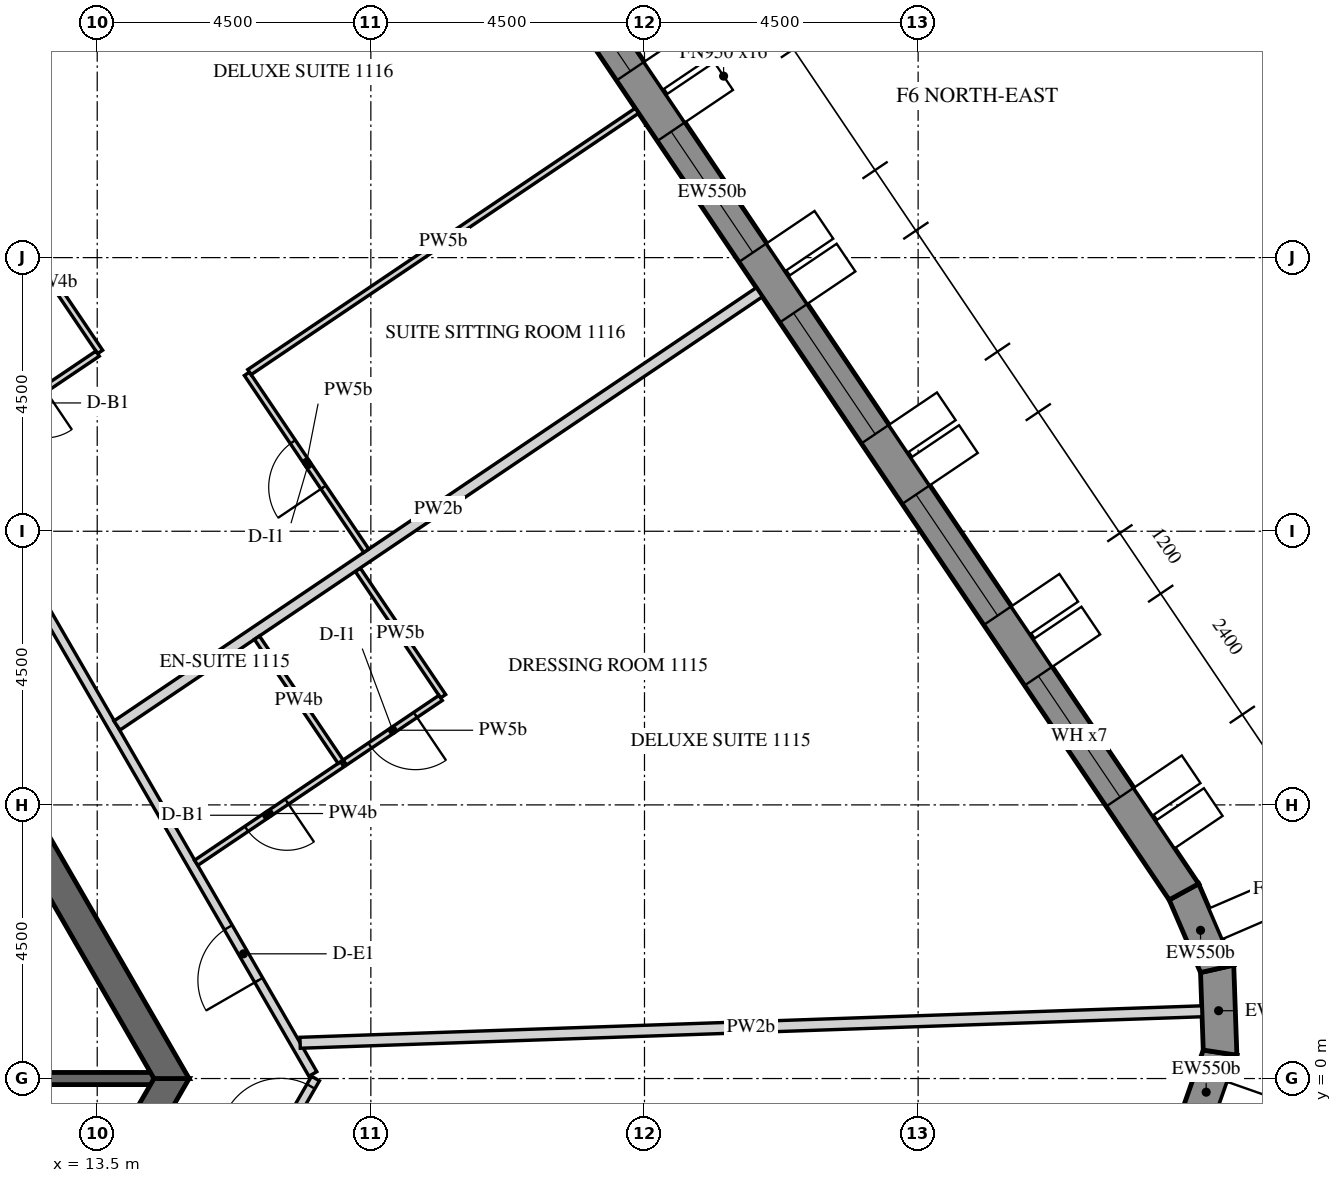
"""IFC4 building model, lengths in metres.
Left out: names, types, materials, properties, quantities, classifications, styles, units other than length and angle.
Written with IfcOpenShell. Run it as: python <this file> out.ifc"""

import sys

from ifc_helpers import new_model, si_unit, direction, frame, frame_2d, origin, place, context, subcontext, project, spatial, polyline, rectangle, outline, extrude, element, fill, save


model = new_model("IFC4")
c1 = context("Model", 3, precision=1e-05, world=origin(), true_north=direction((0.0, 1.0)))
c2 = subcontext(c1, "Body", "Model", "MODEL_VIEW")
j1 = project(units=[si_unit("LENGTHUNIT", "METRE"), si_unit("PLANEANGLEUNIT", "RADIAN")], contexts=[c1])
p1 = place(None, origin())
s1 = spatial("IfcSite", under=j1, at=p1, CompositionType="ELEMENT")
p2 = place(p1, origin())
s2 = spatial("IfcBuilding", under=s1, at=p2, CompositionType="ELEMENT")
p3 = place(p2, frame((0.0, 0.0, 152.7)))
s3 = spatial("IfcBuildingStorey", under=s2, at=p3, CompositionType="ELEMENT", Elevation=152.7)
p4 = place(p3, frame((31.509, -0.875, 0.0), z_axis=(0.0, 0.0, 1.0), x_axis=(0.33111537203, 0.943590276765, 0.0)))
e1 = element("IfcWall", 1, at=p4, inside=s3, PredefinedType="SOLIDWALL", context=c2, shape_type="SweptSolid", body=[
    extrude(outline(polyline([(-0.026, -0.275), (1.431, -0.275), (1.327, 0.275), (0.026, 0.275), (-0.026, -0.275)])), origin(), (0.0, 0.0, 1.0), 3.75),
])
p5 = place(p3, frame((31.966, 0.426, 0.0), z_axis=(0.0, 0.0, 1.0), x_axis=(-0.034876908462, 0.999391615562, 0.0)))
e2 = element("IfcWall", 2, at=p5, inside=s3, PredefinedType="SOLIDWALL", context=c2, shape_type="SweptSolid", body=[
    extrude(outline(polyline([(-0.052, -0.275), (1.431, -0.275), (1.327, 0.275), (0.052, 0.275), (-0.052, -0.275)])), origin(), (0.0, 0.0, 1.0), 3.75),
])
p6 = place(p3, frame((31.917, 1.804, 0.0), z_axis=(0.0, 0.0, 1.0), x_axis=(-0.396225741392, 0.918153125496, 0.0)))
e3 = element("IfcWall", 3, at=p6, inside=s3, PredefinedType="SOLIDWALL", context=c2, shape_type="SweptSolid", body=[
    extrude(outline(polyline([(-0.052, -0.275), (1.405, -0.275), (1.353, 0.275), (0.052, 0.275), (-0.052, -0.275)])), origin(), (0.0, 0.0, 1.0), 3.75),
])
p7 = place(p3, frame((31.371, 3.071, 0.0), z_axis=(0.0, 0.0, 1.0), x_axis=(-0.559189891278, 0.829039604297, 0.0)))
e4 = element("IfcWall", 4, at=p7, inside=s3, PredefinedType="SOLIDWALL", context=c2, shape_type="SweptSolid", body=[
    extrude(outline(polyline([(-0.026, -0.275), (27.781, -0.275), (27.736, 0.275), (0.026, 0.275), (-0.026, -0.275)])), origin(), (0.0, 0.0, 1.0), 3.75),
])
p8 = place(p7, frame((1.879, 0.0, 0.9)))
e5 = element("IfcOpeningElement", 5, at=p8, cuts=e4, PredefinedType="OPENING", context=c2, shape_type="SweptSolid", body=[
    extrude(rectangle(XDim=2.4, YDim=2.4, at=frame_2d((1.2, 1.2))), frame((0.0, 0.285, 0.0), z_axis=(0.0, -1.0, 0.0), x_axis=(1.0, 0.0, 0.0)), (0.0, 0.0, 1.0), 0.57),
])
p9 = place(p7, frame((5.479, 0.0, 0.9)))
e6 = element("IfcOpeningElement", 6, at=p9, cuts=e4, PredefinedType="OPENING", context=c2, shape_type="SweptSolid", body=[
    extrude(rectangle(XDim=2.4, YDim=2.4, at=frame_2d((1.2, 1.2))), frame((0.0, 0.285, 0.0), z_axis=(0.0, -1.0, 0.0), x_axis=(1.0, 0.0, 0.0)), (0.0, 0.0, 1.0), 0.57),
])
p10 = place(p7, frame((9.079, 0.0, 0.9)))
e7 = element("IfcOpeningElement", 7, at=p10, cuts=e4, PredefinedType="OPENING", context=c2, shape_type="SweptSolid", body=[
    extrude(rectangle(XDim=2.4, YDim=2.4, at=frame_2d((1.2, 1.2))), frame((0.0, 0.285, 0.0), z_axis=(0.0, -1.0, 0.0), x_axis=(1.0, 0.0, 0.0)), (0.0, 0.0, 1.0), 0.57),
])
p11 = place(p7, frame((12.679, 0.0, 0.9)))
e8 = element("IfcOpeningElement", 8, at=p11, cuts=e4, PredefinedType="OPENING", context=c2, shape_type="SweptSolid", body=[
    extrude(rectangle(XDim=2.4, YDim=2.4, at=frame_2d((1.2, 1.2))), frame((0.0, 0.285, 0.0), z_axis=(0.0, -1.0, 0.0), x_axis=(1.0, 0.0, 0.0)), (0.0, 0.0, 1.0), 0.57),
])
p12 = place(p7, frame((16.279, 0.0, 0.9)))
e9 = element("IfcOpeningElement", 9, at=p12, cuts=e4, PredefinedType="OPENING", context=c2, shape_type="SweptSolid", body=[
    extrude(rectangle(XDim=2.4, YDim=2.4, at=frame_2d((1.2, 1.2))), frame((0.0, 0.285, 0.0), z_axis=(0.0, -1.0, 0.0), x_axis=(1.0, 0.0, 0.0)), (0.0, 0.0, 1.0), 0.57),
])
p13 = place(p7, frame((19.879, 0.0, 0.9)))
e10 = element("IfcOpeningElement", 10, at=p13, cuts=e4, PredefinedType="OPENING", context=c2, shape_type="SweptSolid", body=[
    extrude(rectangle(XDim=2.4, YDim=2.4, at=frame_2d((1.2, 1.2))), frame((0.0, 0.285, 0.0), z_axis=(0.0, -1.0, 0.0), x_axis=(1.0, 0.0, 0.0)), (0.0, 0.0, 1.0), 0.57),
])
p14 = place(p7, frame((23.479, 0.0, 0.9)))
e11 = element("IfcOpeningElement", 11, at=p14, cuts=e4, PredefinedType="OPENING", context=c2, shape_type="SweptSolid", body=[
    extrude(rectangle(XDim=2.4, YDim=2.4, at=frame_2d((1.2, 1.2))), frame((0.0, 0.285, 0.0), z_axis=(0.0, -1.0, 0.0), x_axis=(1.0, 0.0, 0.0)), (0.0, 0.0, 1.0), 0.57),
])
p15 = place(p3, frame((7.361, -12.75, 0.0), z_axis=(0.0, 0.0, 1.0), x_axis=(0.50000571537, 0.866022103989, 0.0)))
e12 = element("IfcWall", 12, at=p15, inside=s3, PredefinedType="SHEAR", context=c2, shape_type="SweptSolid", body=[
    extrude(outline(polyline([(-0.144, -0.25), (14.867, -0.25), (14.578, 0.25), (0.144, 0.25), (-0.144, -0.25)])), origin(), (0.0, 0.0, 1.0), 3.75),
])
p16 = place(p15, frame((6.49, 0.0, 0.0)))
e13 = element("IfcOpeningElement", 13, at=p16, cuts=e12, PredefinedType="OPENING", context=c2, shape_type="SweptSolid", body=[
    extrude(rectangle(XDim=1.8, YDim=2.4, at=frame_2d((0.9, 1.2))), frame((0.0, 0.26, 0.0), z_axis=(0.0, -1.0, 0.0), x_axis=(1.0, 0.0, 0.0)), (0.0, 0.0, 1.0), 0.52),
])
p17 = place(p3, frame((14.722, 0.0, 0.0), z_axis=(0.0, 0.0, 1.0), x_axis=(-0.50000571537, 0.866022103989, 0.0)))
e14 = element("IfcWall", 14, at=p17, inside=s3, PredefinedType="SHEAR", context=c2, shape_type="SweptSolid", body=[
    extrude(outline(polyline([(-0.144, -0.25), (14.867, -0.25), (14.578, 0.25), (0.144, 0.25), (-0.144, -0.25)])), origin(), (0.0, 0.0, 1.0), 3.75),
])
p18 = place(p17, frame((6.432, 0.0, 0.0)))
e15 = element("IfcOpeningElement", 15, at=p18, cuts=e14, PredefinedType="OPENING", context=c2, shape_type="SweptSolid", body=[
    extrude(rectangle(XDim=1.8, YDim=2.4, at=frame_2d((0.9, 1.2))), frame((0.0, 0.26, 0.0), z_axis=(0.0, -1.0, 0.0), x_axis=(1.0, 0.0, 0.0)), (0.0, 0.0, 1.0), 0.52),
])
p19 = place(p3, frame((7.506, 13.0, 0.0), z_axis=(0.0, 0.0, 1.0), x_axis=(0.499988271576, 0.866032175087, 0.0)))
e16 = element("IfcWall", 16, at=p19, inside=s3, PredefinedType="SHEAR", context=c2, shape_type="SweptSolid", body=[
    extrude(rectangle(XDim=15.424, YDim=0.5, at=frame_2d((7.712, 0.0))), origin(), (0.0, 0.0, 1.0), 3.75),
])
p20 = place(p19, frame((6.812, 0.0, 0.0)))
e17 = element("IfcOpeningElement", 17, at=p20, cuts=e16, PredefinedType="OPENING", context=c2, shape_type="SweptSolid", body=[
    extrude(rectangle(XDim=1.8, YDim=2.4, at=frame_2d((0.9, 1.2))), frame((0.0, 0.26, 0.0), z_axis=(0.0, -1.0, 0.0), x_axis=(1.0, 0.0, 0.0)), (0.0, 0.0, 1.0), 0.52),
])
p21 = place(p3, frame((11.547, 0.0, 0.0), z_axis=(0.0, 0.0, 1.0), x_axis=(1.0, 0.0, 0.0)))
e18 = element("IfcWall", 18, at=p21, inside=s3, PredefinedType="SHEAR", context=c2, shape_type="SweptSolid", body=[
    extrude(rectangle(XDim=2.887, YDim=0.2, at=frame_2d((1.443, 0.0))), origin(), (0.0, 0.0, 1.0), 3.75),
])
p22 = place(p3, frame((10.714, -11.043, 0.0), z_axis=(0.0, 0.0, 1.0), x_axis=(0.500001980452, 0.866024260367, 0.0)))
e19 = element("IfcWall", 19, at=p22, inside=s3, PredefinedType="PARTITIONING", context=c2, shape_type="SweptSolid", body=[
    extrude(rectangle(XDim=12.752, YDim=0.15, at=frame_2d((6.376, 0.0))), origin(), (0.0, 0.0, 1.0), 2.823),
])
p23 = place(p22, frame((3.625, 0.0, 0.0)))
e20 = element("IfcOpeningElement", 20, at=p23, cuts=e19, PredefinedType="OPENING", context=c2, shape_type="SweptSolid", body=[
    extrude(rectangle(XDim=1.0, YDim=2.1, at=frame_2d((0.5, 1.05))), frame((0.0, 0.085, 0.0), z_axis=(0.0, -1.0, 0.0), x_axis=(1.0, 0.0, 0.0)), (0.0, 0.0, 1.0), 0.17),
])
p24 = place(p22, frame((11.602, 0.0, 0.0)))
e21 = element("IfcOpeningElement", 21, at=p24, cuts=e19, PredefinedType="OPENING", context=c2, shape_type="SweptSolid", body=[
    extrude(rectangle(XDim=1.0, YDim=2.1, at=frame_2d((0.5, 1.05))), frame((0.0, 0.085, 0.0), z_axis=(0.0, -1.0, 0.0), x_axis=(1.0, 0.0, 0.0)), (0.0, 0.0, 1.0), 0.17),
])
p25 = place(p3, frame((17.046, 0.075, 0.0), z_axis=(0.0, 0.0, 1.0), x_axis=(-0.499999403554, 0.866025748143, 0.0)))
e22 = element("IfcWall", 22, at=p25, inside=s3, PredefinedType="PARTITIONING", context=c2, shape_type="SweptSolid", body=[
    extrude(rectangle(XDim=14.549, YDim=0.15, at=frame_2d((7.275, 0.0))), origin(), (0.0, 0.0, 1.0), 2.823),
])
p26 = place(p25, frame((1.781, 0.0, 0.0)))
e23 = element("IfcOpeningElement", 23, at=p26, cuts=e22, PredefinedType="OPENING", context=c2, shape_type="SweptSolid", body=[
    extrude(rectangle(XDim=1.0, YDim=2.1, at=frame_2d((0.5, 1.05))), frame((0.0, 0.085, 0.0), z_axis=(0.0, -1.0, 0.0), x_axis=(1.0, 0.0, 0.0)), (0.0, 0.0, 1.0), 0.17),
])
p27 = place(p25, frame((8.705, 0.0, 0.0)))
e24 = element("IfcOpeningElement", 24, at=p27, cuts=e22, PredefinedType="OPENING", context=c2, shape_type="SweptSolid", body=[
    extrude(rectangle(XDim=1.0, YDim=2.1, at=frame_2d((0.5, 1.05))), frame((0.0, 0.085, 0.0), z_axis=(0.0, -1.0, 0.0), x_axis=(1.0, 0.0, 0.0)), (0.0, 0.0, 1.0), 0.17),
])
p28 = place(p3, frame((9.728, 12.75, 0.0), z_axis=(0.0, 0.0, 1.0), x_axis=(0.500007149838, 0.866021275784, 0.0)))
e25 = element("IfcWall", 25, at=p28, inside=s3, PredefinedType="PARTITIONING", context=c2, shape_type="SweptSolid", body=[
    extrude(rectangle(XDim=8.017, YDim=0.15, at=frame_2d((4.009, 0.0))), origin(), (0.0, 0.0, 1.0), 2.823),
])
p29 = place(p3, frame((31.667, 1.106, 0.0), z_axis=(0.0, 0.0, 1.0), x_axis=(-0.999390937365, -0.034896336667, 0.0)))
e26 = element("IfcWall", 26, at=p29, inside=s3, PredefinedType="PARTITIONING", context=c2, shape_type="SweptSolid", body=[
    extrude(rectangle(XDim=14.839, YDim=0.18, at=frame_2d((7.419, 0.0))), origin(), (0.0, 0.0, 1.0), 2.823),
])
p30 = place(p3, frame((17.53, 5.168, 0.0), z_axis=(0.0, 0.0, 1.0), x_axis=(-0.829031257997, -0.559202265073, 0.0)))
e27 = element("IfcWall", 27, at=p30, inside=s3, PredefinedType="PARTITIONING", context=c2, shape_type="SweptSolid", body=[
    extrude(rectangle(XDim=2.898, YDim=0.1, at=frame_2d((1.449, 0.0))), origin(), (0.0, 0.0, 1.0), 2.823),
])
p31 = place(p30, frame((1.1, 0.0, 0.0)))
e28 = element("IfcOpeningElement", 28, at=p31, cuts=e27, PredefinedType="OPENING", context=c2, shape_type="SweptSolid", body=[
    extrude(rectangle(XDim=0.8, YDim=2.1, at=frame_2d((0.4, 1.05))), frame((0.0, 0.06, 0.0), z_axis=(0.0, -1.0, 0.0), x_axis=(1.0, 0.0, 0.0)), (0.0, 0.0, 1.0), 0.12),
])
p32 = place(p3, frame((17.785, 8.368, 0.0), z_axis=(0.0, 0.0, 1.0), x_axis=(0.559203861497, -0.829030181168, 0.0)))
e29 = element("IfcWall", 29, at=p32, inside=s3, PredefinedType="PARTITIONING", context=c2, shape_type="SweptSolid", body=[
    extrude(rectangle(XDim=2.51, YDim=0.1, at=frame_2d((1.255, 0.0))), origin(), (0.0, 0.0, 1.0), 2.823),
])
p33 = place(p3, frame((19.147, 6.259, 0.0), z_axis=(0.0, 0.0, 1.0), x_axis=(-0.82903334026, -0.559199178055, 0.0)))
e30 = element("IfcWall", 30, at=p33, inside=s3, PredefinedType="PARTITIONING", context=c2, shape_type="SweptSolid", body=[
    extrude(rectangle(XDim=1.9, YDim=0.1, at=frame_2d((0.95, 0.0))), origin(), (0.0, 0.0, 1.0), 2.823),
])
p34 = place(p33, frame((0.5, 0.0, 0.0)))
e31 = element("IfcOpeningElement", 31, at=p34, cuts=e30, PredefinedType="OPENING", context=c2, shape_type="SweptSolid", body=[
    extrude(rectangle(XDim=0.9, YDim=2.1, at=frame_2d((0.45, 1.05))), frame((0.0, 0.06, 0.0), z_axis=(0.0, -1.0, 0.0), x_axis=(1.0, 0.0, 0.0)), (0.0, 0.0, 1.0), 0.12),
])
p35 = place(p3, frame((24.389, 12.931, 0.0), z_axis=(0.0, 0.0, 1.0), x_axis=(-0.829049407957, -0.559175356365, 0.0)))
e32 = element("IfcWall", 32, at=p35, inside=s3, PredefinedType="PARTITIONING", context=c2, shape_type="SweptSolid", body=[
    extrude(rectangle(XDim=12.743, YDim=0.18, at=frame_2d((6.372, 0.0))), origin(), (0.0, 0.0, 1.0), 2.823),
])
p36 = place(p3, frame((17.502, 5.21, 0.0), z_axis=(0.0, 0.0, 1.0), x_axis=(-0.559203533395, 0.829030402481, 0.0)))
e33 = element("IfcWall", 33, at=p36, inside=s3, PredefinedType="PARTITIONING", context=c2, shape_type="SweptSolid", body=[
    extrude(rectangle(XDim=2.46, YDim=0.1, at=frame_2d((1.23, 0.0))), origin(), (0.0, 0.0, 1.0), 2.823),
])
p37 = place(p3, frame((12.01, 14.229, 0.0), z_axis=(0.0, 0.0, 1.0), x_axis=(0.559158698756, -0.8290606429, 0.0)))
e34 = element("IfcWall", 34, at=p37, inside=s3, PredefinedType="PARTITIONING", context=c2, shape_type="SweptSolid", body=[
    extrude(rectangle(XDim=2.75, YDim=0.1, at=frame_2d((1.375, 0.0))), origin(), (0.0, 0.0, 1.0), 2.823),
])
p38 = place(p3, frame((13.506, 11.921, 0.0), z_axis=(0.0, 0.0, 1.0), x_axis=(-0.829048535811, -0.559176649431, 0.0)))
e35 = element("IfcWall", 35, at=p38, inside=s3, PredefinedType="PARTITIONING", context=c2, shape_type="SweptSolid", body=[
    extrude(rectangle(XDim=2.789, YDim=0.1, at=frame_2d((1.395, 0.0))), origin(), (0.0, 0.0, 1.0), 2.823),
])
p39 = place(p38, frame((1.05, 0.0, 0.0)))
e36 = element("IfcOpeningElement", 36, at=p39, cuts=e35, PredefinedType="OPENING", context=c2, shape_type="SweptSolid", body=[
    extrude(rectangle(XDim=0.8, YDim=2.1, at=frame_2d((0.4, 1.05))), frame((0.0, 0.06, 0.0), z_axis=(0.0, -1.0, 0.0), x_axis=(1.0, 0.0, 0.0)), (0.0, 0.0, 1.0), 0.12),
])
p40 = place(p3, frame((17.925, 8.679, 0.0), z_axis=(0.0, 0.0, 1.0), x_axis=(-0.559170576854, 0.829052631611, 0.0)))
e37 = element("IfcWall", 37, at=p40, inside=s3, PredefinedType="PARTITIONING", context=c2, shape_type="SweptSolid", body=[
    extrude(rectangle(XDim=3.51, YDim=0.1, at=frame_2d((1.755, 0.0))), origin(), (0.0, 0.0, 1.0), 2.823),
])
p41 = place(p40, frame((1.26, 0.0, 0.0)))
e38 = element("IfcOpeningElement", 38, at=p41, cuts=e37, PredefinedType="OPENING", context=c2, shape_type="SweptSolid", body=[
    extrude(rectangle(XDim=0.9, YDim=2.1, at=frame_2d((0.45, 1.05))), frame((0.0, 0.06, 0.0), z_axis=(0.0, -1.0, 0.0), x_axis=(1.0, 0.0, 0.0)), (0.0, 0.0, 1.0), 0.12),
])
p42 = place(p3, frame((16.003, 11.617, 0.0), z_axis=(0.0, 0.0, 1.0), x_axis=(0.829037886281, 0.559192438352, 0.0)))
e39 = element("IfcWall", 39, at=p42, inside=s3, PredefinedType="PARTITIONING", context=c2, shape_type="SweptSolid", body=[
    extrude(rectangle(XDim=7.687, YDim=0.1, at=frame_2d((3.843, 0.0))), origin(), (0.0, 0.0, 1.0), 2.823),
])
p43 = place(p8, frame((0.0, 0.205, 0.0)))
e40 = element("IfcWindow", 40, at=p43, inside=s3, PartitioningType="DOUBLE_PANEL_VERTICAL", PredefinedType="WINDOW", context=c2, shape_type="SweptSolid", body=[
    extrude(rectangle(XDim=2.4, YDim=2.4, at=frame_2d((1.2, 1.2))), frame((0.0, 0.03, 0.0), z_axis=(0.0, -1.0, 0.0), x_axis=(1.0, 0.0, 0.0)), (0.0, 0.0, 1.0), 0.06),
])
fill(e5, e40)
p44 = place(p9, frame((0.0, 0.205, 0.0)))
e41 = element("IfcWindow", 41, at=p44, inside=s3, PartitioningType="DOUBLE_PANEL_VERTICAL", PredefinedType="WINDOW", context=c2, shape_type="SweptSolid", body=[
    extrude(rectangle(XDim=2.4, YDim=2.4, at=frame_2d((1.2, 1.2))), frame((0.0, 0.03, 0.0), z_axis=(0.0, -1.0, 0.0), x_axis=(1.0, 0.0, 0.0)), (0.0, 0.0, 1.0), 0.06),
])
fill(e6, e41)
p45 = place(p10, frame((0.0, 0.205, 0.0)))
e42 = element("IfcWindow", 42, at=p45, inside=s3, PartitioningType="DOUBLE_PANEL_VERTICAL", PredefinedType="WINDOW", context=c2, shape_type="SweptSolid", body=[
    extrude(rectangle(XDim=2.4, YDim=2.4, at=frame_2d((1.2, 1.2))), frame((0.0, 0.03, 0.0), z_axis=(0.0, -1.0, 0.0), x_axis=(1.0, 0.0, 0.0)), (0.0, 0.0, 1.0), 0.06),
])
fill(e7, e42)
p46 = place(p11, frame((0.0, 0.205, 0.0)))
e43 = element("IfcWindow", 43, at=p46, inside=s3, PartitioningType="DOUBLE_PANEL_VERTICAL", PredefinedType="WINDOW", context=c2, shape_type="SweptSolid", body=[
    extrude(rectangle(XDim=2.4, YDim=2.4, at=frame_2d((1.2, 1.2))), frame((0.0, 0.03, 0.0), z_axis=(0.0, -1.0, 0.0), x_axis=(1.0, 0.0, 0.0)), (0.0, 0.0, 1.0), 0.06),
])
fill(e8, e43)
p47 = place(p12, frame((0.0, 0.205, 0.0)))
e44 = element("IfcWindow", 44, at=p47, inside=s3, PartitioningType="DOUBLE_PANEL_VERTICAL", PredefinedType="WINDOW", context=c2, shape_type="SweptSolid", body=[
    extrude(rectangle(XDim=2.4, YDim=2.4, at=frame_2d((1.2, 1.2))), frame((0.0, 0.03, 0.0), z_axis=(0.0, -1.0, 0.0), x_axis=(1.0, 0.0, 0.0)), (0.0, 0.0, 1.0), 0.06),
])
fill(e9, e44)
p48 = place(p24, origin())
e45 = element("IfcDoor", 45, at=p48, inside=s3, OperationType="SINGLE_SWING_LEFT", PredefinedType="DOOR", context=c2, shape_type="SweptSolid", body=[
    extrude(rectangle(XDim=1.0, YDim=2.1, at=frame_2d((0.5, 1.05))), frame((0.0, 0.025, 0.0), z_axis=(0.0, -1.0, 0.0), x_axis=(1.0, 0.0, 0.0)), (0.0, 0.0, 1.0), 0.05),
])
fill(e21, e45)
p49 = place(p26, origin())
e46 = element("IfcDoor", 46, at=p49, inside=s3, OperationType="SINGLE_SWING_LEFT", PredefinedType="DOOR", context=c2, shape_type="SweptSolid", body=[
    extrude(rectangle(XDim=1.0, YDim=2.1, at=frame_2d((0.5, 1.05))), frame((0.0, 0.025, 0.0), z_axis=(0.0, -1.0, 0.0), x_axis=(1.0, 0.0, 0.0)), (0.0, 0.0, 1.0), 0.05),
])
fill(e23, e46)
p50 = place(p31, origin())
e47 = element("IfcDoor", 47, at=p50, inside=s3, OperationType="SINGLE_SWING_LEFT", PredefinedType="DOOR", context=c2, shape_type="SweptSolid", body=[
    extrude(rectangle(XDim=0.8, YDim=2.1, at=frame_2d((0.4, 1.05))), frame((0.0, 0.025, 0.0), z_axis=(0.0, -1.0, 0.0), x_axis=(1.0, 0.0, 0.0)), (0.0, 0.0, 1.0), 0.05),
])
fill(e28, e47)
p51 = place(p34, origin())
e48 = element("IfcDoor", 48, at=p51, inside=s3, OperationType="SINGLE_SWING_RIGHT", PredefinedType="DOOR", context=c2, shape_type="SweptSolid", body=[
    extrude(rectangle(XDim=0.9, YDim=2.1, at=frame_2d((0.45, 1.05))), frame((0.0, 0.025, 0.0), z_axis=(0.0, -1.0, 0.0), x_axis=(1.0, 0.0, 0.0)), (0.0, 0.0, 1.0), 0.05),
])
fill(e31, e48)
p52 = place(p41, origin())
e49 = element("IfcDoor", 49, at=p52, inside=s3, OperationType="SINGLE_SWING_RIGHT", PredefinedType="DOOR", context=c2, shape_type="SweptSolid", body=[
    extrude(rectangle(XDim=0.9, YDim=2.1, at=frame_2d((0.45, 1.05))), frame((0.0, 0.025, 0.0), z_axis=(0.0, -1.0, 0.0), x_axis=(1.0, 0.0, 0.0)), (0.0, 0.0, 1.0), 0.05),
])
fill(e38, e49)
save(model, sys.argv[1])
